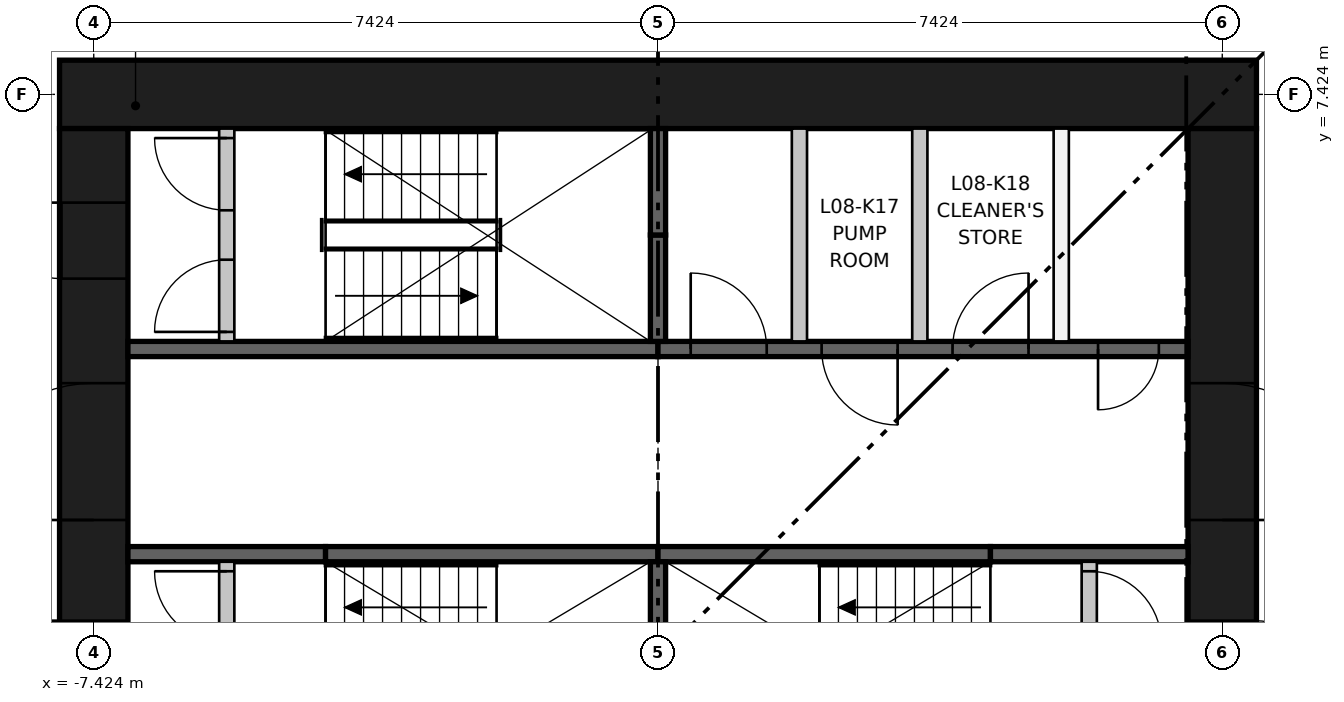
"""IFC4 building model, lengths in metres.
Left out: names, types, materials, properties, quantities, classifications, styles, units other than length and angle.
Written with IfcOpenShell. Run it as: python <this file> out.ifc"""

import sys

from ifc_helpers import new_model, si_unit, direction, frame, frame_2d, origin, place, context, subcontext, project, spatial, rectangle, extrude, element, fill, save


model = new_model("IFC4")
c1 = context("Model", 3, precision=1e-05, world=origin(), true_north=direction((0.0, 1.0)))
c2 = subcontext(c1, "Body", "Model", "MODEL_VIEW")
j1 = project(units=[si_unit("LENGTHUNIT", "METRE"), si_unit("PLANEANGLEUNIT", "RADIAN")], contexts=[c1])
p1 = place(None, origin())
s1 = spatial("IfcSite", under=j1, at=p1, CompositionType="ELEMENT")
p2 = place(p1, origin())
s2 = spatial("IfcBuilding", under=s1, at=p2, CompositionType="ELEMENT")
p3 = place(p2, frame((0.0, 0.0, 33.5)))
s3 = spatial("IfcBuildingStorey", under=s2, at=p3, CompositionType="ELEMENT", Elevation=33.5)
p4 = place(p3, frame((-7.874, 7.424, 0.0), z_axis=(0.0, 0.0, 1.0), x_axis=(1.0, 0.0, 0.0)))
e1 = element("IfcWall", 1, at=p4, inside=s3, PredefinedType="SHEAR", context=c2, shape_type="SweptSolid", body=[
    extrude(rectangle(XDim=15.748, YDim=0.9, at=frame_2d((7.874, 0.0))), origin(), (0.0, 0.0, 1.0), 3.65),
])
p5 = place(p3, frame((-7.424, -6.974, 0.0), z_axis=(0.0, 0.0, 1.0), x_axis=(0.0, 1.0, 0.0)))
e2 = element("IfcWall", 2, at=p5, inside=s3, PredefinedType="SHEAR", context=c2, shape_type="SweptSolid", body=[
    extrude(rectangle(XDim=13.948, YDim=0.9, at=frame_2d((6.974, 0.0))), origin(), (0.0, 0.0, 1.0), 3.65),
])
p6 = place(p5, frame((6.474, 0.0, 0.0)))
e3 = element("IfcOpeningElement", 3, at=p6, cuts=e2, PredefinedType="OPENING", context=c2, shape_type="SweptSolid", body=[
    extrude(rectangle(XDim=1.0, YDim=2.1, at=frame_2d((0.5, 1.05))), frame((0.0, 0.46, 0.0), z_axis=(0.0, -1.0, 0.0), x_axis=(1.0, 0.0, 0.0)), (0.0, 0.0, 1.0), 0.92),
])
p7 = place(p5, frame((3.35, 0.0, 0.0)))
e4 = element("IfcOpeningElement", 4, at=p7, cuts=e2, PredefinedType="OPENING", context=c2, shape_type="SweptSolid", body=[
    extrude(rectangle(XDim=1.8, YDim=2.1, at=frame_2d((0.9, 1.05))), frame((0.0, 0.46, 0.0), z_axis=(0.0, -1.0, 0.0), x_axis=(1.0, 0.0, 0.0)), (0.0, 0.0, 1.0), 0.92),
])
p8 = place(p5, frame((8.799, 0.0, 0.0)))
e5 = element("IfcOpeningElement", 5, at=p8, cuts=e2, PredefinedType="OPENING", context=c2, shape_type="SweptSolid", body=[
    extrude(rectangle(XDim=1.8, YDim=2.1, at=frame_2d((0.9, 1.05))), frame((0.0, 0.46, 0.0), z_axis=(0.0, -1.0, 0.0), x_axis=(1.0, 0.0, 0.0)), (0.0, 0.0, 1.0), 0.92),
])
p9 = place(p5, frame((11.974, 0.0, 0.0)))
e6 = element("IfcOpeningElement", 6, at=p9, cuts=e2, PredefinedType="OPENING", context=c2, shape_type="SweptSolid", body=[
    extrude(rectangle(XDim=1.0, YDim=2.1, at=frame_2d((0.5, 1.05))), frame((0.0, 0.46, 0.0), z_axis=(0.0, -1.0, 0.0), x_axis=(1.0, 0.0, 0.0)), (0.0, 0.0, 1.0), 0.92),
])
p10 = place(p3, frame((7.424, -6.974, 0.0), z_axis=(0.0, 0.0, 1.0), x_axis=(0.0, 1.0, 0.0)))
e7 = element("IfcWall", 7, at=p10, inside=s3, PredefinedType="SHEAR", context=c2, shape_type="SweptSolid", body=[
    extrude(rectangle(XDim=13.948, YDim=0.9, at=frame_2d((6.974, 0.0))), origin(), (0.0, 0.0, 1.0), 3.65),
])
p11 = place(p10, frame((6.474, 0.0, 0.0)))
e8 = element("IfcOpeningElement", 8, at=p11, cuts=e7, PredefinedType="OPENING", context=c2, shape_type="SweptSolid", body=[
    extrude(rectangle(XDim=1.0, YDim=2.1, at=frame_2d((0.5, 1.05))), frame((0.0, 0.46, 0.0), z_axis=(0.0, -1.0, 0.0), x_axis=(1.0, 0.0, 0.0)), (0.0, 0.0, 1.0), 0.92),
])
p12 = place(p10, frame((3.35, 0.0, 0.0)))
e9 = element("IfcOpeningElement", 9, at=p12, cuts=e7, PredefinedType="OPENING", context=c2, shape_type="SweptSolid", body=[
    extrude(rectangle(XDim=1.8, YDim=2.1, at=frame_2d((0.9, 1.05))), frame((0.0, 0.46, 0.0), z_axis=(0.0, -1.0, 0.0), x_axis=(1.0, 0.0, 0.0)), (0.0, 0.0, 1.0), 0.92),
])
p13 = place(p10, frame((8.799, 0.0, 0.0)))
e10 = element("IfcOpeningElement", 10, at=p13, cuts=e7, PredefinedType="OPENING", context=c2, shape_type="SweptSolid", body=[
    extrude(rectangle(XDim=1.8, YDim=2.1, at=frame_2d((0.9, 1.05))), frame((0.0, 0.46, 0.0), z_axis=(0.0, -1.0, 0.0), x_axis=(1.0, 0.0, 0.0)), (0.0, 0.0, 1.0), 0.92),
])
p14 = place(p3, frame((-6.974, 4.074, 0.0), z_axis=(0.0, 0.0, 1.0), x_axis=(1.0, 0.0, 0.0)))
e11 = element("IfcWall", 11, at=p14, inside=s3, PredefinedType="SHEAR", context=c2, shape_type="SweptSolid", body=[
    extrude(rectangle(XDim=6.974, YDim=0.2, at=frame_2d((3.487, 0.0))), origin(), (0.0, 0.0, 1.0), 3.3),
])
p15 = place(p3, frame((0.0, 4.074, 0.0), z_axis=(0.0, 0.0, 1.0), x_axis=(1.0, 0.0, 0.0)))
e12 = element("IfcWall", 12, at=p15, inside=s3, PredefinedType="SHEAR", context=c2, shape_type="SweptSolid", body=[
    extrude(rectangle(XDim=6.974, YDim=0.2, at=frame_2d((3.487, 0.0))), origin(), (0.0, 0.0, 1.0), 3.3),
])
p16 = place(p15, frame((0.43, 0.0, 0.0)))
e13 = element("IfcOpeningElement", 13, at=p16, cuts=e12, PredefinedType="OPENING", context=c2, shape_type="SweptSolid", body=[
    extrude(rectangle(XDim=1.0, YDim=2.1, at=frame_2d((0.5, 1.05))), frame((0.0, 0.11, 0.0), z_axis=(0.0, -1.0, 0.0), x_axis=(1.0, 0.0, 0.0)), (0.0, 0.0, 1.0), 0.22),
])
p17 = place(p15, frame((2.153, 0.0, 0.0)))
e14 = element("IfcOpeningElement", 14, at=p17, cuts=e12, PredefinedType="OPENING", context=c2, shape_type="SweptSolid", body=[
    extrude(rectangle(XDim=1.0, YDim=2.1, at=frame_2d((0.5, 1.05))), frame((0.0, 0.11, 0.0), z_axis=(0.0, -1.0, 0.0), x_axis=(1.0, 0.0, 0.0)), (0.0, 0.0, 1.0), 0.22),
])
p18 = place(p15, frame((3.875, 0.0, 0.0)))
e15 = element("IfcOpeningElement", 15, at=p18, cuts=e12, PredefinedType="OPENING", context=c2, shape_type="SweptSolid", body=[
    extrude(rectangle(XDim=1.0, YDim=2.1, at=frame_2d((0.5, 1.05))), frame((0.0, 0.11, 0.0), z_axis=(0.0, -1.0, 0.0), x_axis=(1.0, 0.0, 0.0)), (0.0, 0.0, 1.0), 0.22),
])
p19 = place(p15, frame((5.79, 0.0, 0.0)))
e16 = element("IfcOpeningElement", 16, at=p19, cuts=e12, PredefinedType="OPENING", context=c2, shape_type="SweptSolid", body=[
    extrude(rectangle(XDim=0.8, YDim=2.1, at=frame_2d((0.4, 1.05))), frame((0.0, 0.11, 0.0), z_axis=(0.0, -1.0, 0.0), x_axis=(1.0, 0.0, 0.0)), (0.0, 0.0, 1.0), 0.22),
])
p20 = place(p3, frame((-6.974, 1.375, 0.0), z_axis=(0.0, 0.0, 1.0), x_axis=(1.0, 0.0, 0.0)))
e17 = element("IfcWall", 17, at=p20, inside=s3, PredefinedType="SHEAR", context=c2, shape_type="SweptSolid", body=[
    extrude(rectangle(XDim=2.6, YDim=0.2, at=frame_2d((1.3, 0.0))), origin(), (0.0, 0.0, 1.0), 3.3),
])
for number, where, z_axis, x_axis in (
    (18, (-4.374, 1.375, 0.0), (0.0, 0.0, 1.0), (1.0, 0.0, 0.0)),
    (19, (0.0, 1.375, 0.0), (0.0, 0.0, 1.0), (1.0, 0.0, 0.0)),
):
    element("IfcWall", number, at=place(p3, frame(where, z_axis=z_axis, x_axis=x_axis)), inside=s3, PredefinedType="SHEAR", context=c2, shape_type="SweptSolid", body=[
        extrude(rectangle(XDim=4.374, YDim=0.2, at=frame_2d((2.187, 0.0))), origin(), (0.0, 0.0, 1.0), 3.3),
    ])
p21 = place(p3, frame((4.374, 1.375, 0.0), z_axis=(0.0, 0.0, 1.0), x_axis=(1.0, 0.0, 0.0)))
e20 = element("IfcWall", 20, at=p21, inside=s3, PredefinedType="SHEAR", context=c2, shape_type="SweptSolid", body=[
    extrude(rectangle(XDim=2.6, YDim=0.2, at=frame_2d((1.3, 0.0))), origin(), (0.0, 0.0, 1.0), 3.3),
])
p22 = place(p3, frame((0.0, -1.275, 0.0), z_axis=(0.0, 0.0, 1.0), x_axis=(0.0, 1.0, 0.0)))
e21 = element("IfcWall", 21, at=p22, inside=s3, PredefinedType="SHEAR", context=c2, shape_type="SweptSolid", body=[
    extrude(rectangle(XDim=2.55, YDim=0.2, at=frame_2d((1.275, 0.0))), origin(), (0.0, 0.0, 1.0), 3.3),
])
p23 = place(p3, frame((0.0, 4.174, 0.0), z_axis=(0.0, 0.0, 1.0), x_axis=(0.0, 1.0, 0.0)))
e22 = element("IfcWall", 22, at=p23, inside=s3, PredefinedType="SHEAR", context=c2, shape_type="SweptSolid", body=[
    extrude(rectangle(XDim=1.4, YDim=0.2, at=frame_2d((0.7, 0.0))), origin(), (0.0, 0.0, 1.0), 3.3),
])
p24 = place(p3, frame((0.0, 5.574, 0.0), z_axis=(0.0, 0.0, 1.0), x_axis=(0.0, 1.0, 0.0)))
e23 = element("IfcWall", 23, at=p24, inside=s3, PredefinedType="SHEAR", context=c2, shape_type="SweptSolid", body=[
    extrude(rectangle(XDim=1.4, YDim=0.2, at=frame_2d((0.7, 0.0))), origin(), (0.0, 0.0, 1.0), 3.3),
])
for number, where, z_axis, x_axis in (
    (24, (1.861, 4.174, 0.0), (0.0, 0.0, 1.0), (0.0, 1.0, 0.0)),
    (25, (3.445, 4.174, 0.0), (0.0, 0.0, 1.0), (0.0, 1.0, 0.0)),
    (26, (5.305, 4.174, 0.0), (0.0, 0.0, 1.0), (0.0, 1.0, 0.0)),
):
    element("IfcWall", number, at=place(p3, frame(where, z_axis=z_axis, x_axis=x_axis)), inside=s3, PredefinedType="PARTITIONING", context=c2, shape_type="SweptSolid", body=[
        extrude(rectangle(XDim=2.8, YDim=0.2, at=frame_2d((1.4, 0.0))), origin(), (0.0, 0.0, 1.0), 3.3),
    ])
p25 = place(p3, frame((-5.674, -1.275, 0.0), z_axis=(0.0, 0.0, 1.0), x_axis=(0.0, 1.0, 0.0)))
e27 = element("IfcWall", 27, at=p25, inside=s3, PredefinedType="PARTITIONING", context=c2, shape_type="SweptSolid", body=[
    extrude(rectangle(XDim=2.55, YDim=0.2, at=frame_2d((1.275, 0.0))), origin(), (0.0, 0.0, 1.0), 3.3),
])
p26 = place(p25, frame((0.125, 0.0, 0.0)))
e28 = element("IfcOpeningElement", 28, at=p26, cuts=e27, PredefinedType="OPENING", context=c2, shape_type="SweptSolid", body=[
    extrude(rectangle(XDim=0.95, YDim=2.1, at=frame_2d((0.475, 1.05))), frame((0.0, 0.11, 0.0), z_axis=(0.0, -1.0, 0.0), x_axis=(1.0, 0.0, 0.0)), (0.0, 0.0, 1.0), 0.22),
])
p27 = place(p25, frame((1.475, 0.0, 0.0)))
e29 = element("IfcOpeningElement", 29, at=p27, cuts=e27, PredefinedType="OPENING", context=c2, shape_type="SweptSolid", body=[
    extrude(rectangle(XDim=0.95, YDim=2.1, at=frame_2d((0.475, 1.05))), frame((0.0, 0.11, 0.0), z_axis=(0.0, -1.0, 0.0), x_axis=(1.0, 0.0, 0.0)), (0.0, 0.0, 1.0), 0.22),
])
p28 = place(p3, frame((5.674, -1.275, 0.0), z_axis=(0.0, 0.0, 1.0), x_axis=(0.0, 1.0, 0.0)))
e30 = element("IfcWall", 30, at=p28, inside=s3, PredefinedType="PARTITIONING", context=c2, shape_type="SweptSolid", body=[
    extrude(rectangle(XDim=2.55, YDim=0.2, at=frame_2d((1.275, 0.0))), origin(), (0.0, 0.0, 1.0), 3.3),
])
p29 = place(p28, frame((0.125, 0.0, 0.0)))
e31 = element("IfcOpeningElement", 31, at=p29, cuts=e30, PredefinedType="OPENING", context=c2, shape_type="SweptSolid", body=[
    extrude(rectangle(XDim=0.95, YDim=2.1, at=frame_2d((0.475, 1.05))), frame((0.0, 0.11, 0.0), z_axis=(0.0, -1.0, 0.0), x_axis=(1.0, 0.0, 0.0)), (0.0, 0.0, 1.0), 0.22),
])
p30 = place(p28, frame((1.475, 0.0, 0.0)))
e32 = element("IfcOpeningElement", 32, at=p30, cuts=e30, PredefinedType="OPENING", context=c2, shape_type="SweptSolid", body=[
    extrude(rectangle(XDim=0.95, YDim=2.1, at=frame_2d((0.475, 1.05))), frame((0.0, 0.11, 0.0), z_axis=(0.0, -1.0, 0.0), x_axis=(1.0, 0.0, 0.0)), (0.0, 0.0, 1.0), 0.22),
])
p31 = place(p3, frame((-5.674, 4.174, 0.0), z_axis=(0.0, 0.0, 1.0), x_axis=(0.0, 1.0, 0.0)))
e33 = element("IfcWall", 33, at=p31, inside=s3, PredefinedType="PARTITIONING", context=c2, shape_type="SweptSolid", body=[
    extrude(rectangle(XDim=2.8, YDim=0.2, at=frame_2d((1.4, 0.0))), origin(), (0.0, 0.0, 1.0), 3.3),
])
p32 = place(p31, frame((0.125, 0.0, 0.0)))
e34 = element("IfcOpeningElement", 34, at=p32, cuts=e33, PredefinedType="OPENING", context=c2, shape_type="SweptSolid", body=[
    extrude(rectangle(XDim=0.95, YDim=2.1, at=frame_2d((0.475, 1.05))), frame((0.0, 0.11, 0.0), z_axis=(0.0, -1.0, 0.0), x_axis=(1.0, 0.0, 0.0)), (0.0, 0.0, 1.0), 0.22),
])
p33 = place(p31, frame((1.725, 0.0, 0.0)))
e35 = element("IfcOpeningElement", 35, at=p33, cuts=e33, PredefinedType="OPENING", context=c2, shape_type="SweptSolid", body=[
    extrude(rectangle(XDim=0.95, YDim=2.1, at=frame_2d((0.475, 1.05))), frame((0.0, 0.11, 0.0), z_axis=(0.0, -1.0, 0.0), x_axis=(1.0, 0.0, 0.0)), (0.0, 0.0, 1.0), 0.22),
])
p34 = place(p27, origin())
e36 = element("IfcDoor", 36, at=p34, inside=s3, OperationType="SINGLE_SWING_RIGHT", PredefinedType="DOOR", context=c2, shape_type="SweptSolid", body=[
    extrude(rectangle(XDim=0.95, YDim=2.1, at=frame_2d((0.475, 1.05))), frame((0.0, 0.025, 0.0), z_axis=(0.0, -1.0, 0.0), x_axis=(1.0, 0.0, 0.0)), (0.0, 0.0, 1.0), 0.05),
])
fill(e29, e36)
p35 = place(p30, frame((0.95, 0.0, 0.0), z_axis=(0.0, 0.0, 1.0), x_axis=(-1.0, 0.0, 0.0)))
e37 = element("IfcDoor", 37, at=p35, inside=s3, OperationType="SINGLE_SWING_LEFT", PredefinedType="DOOR", context=c2, shape_type="SweptSolid", body=[
    extrude(rectangle(XDim=0.95, YDim=2.1, at=frame_2d((0.475, 1.05))), frame((0.0, 0.025, 0.0), z_axis=(0.0, -1.0, 0.0), x_axis=(1.0, 0.0, 0.0)), (0.0, 0.0, 1.0), 0.05),
])
fill(e32, e37)
p36 = place(p32, origin())
e38 = element("IfcDoor", 38, at=p36, inside=s3, OperationType="SINGLE_SWING_LEFT", PredefinedType="DOOR", context=c2, shape_type="SweptSolid", body=[
    extrude(rectangle(XDim=0.95, YDim=2.1, at=frame_2d((0.475, 1.05))), frame((0.0, 0.025, 0.0), z_axis=(0.0, -1.0, 0.0), x_axis=(1.0, 0.0, 0.0)), (0.0, 0.0, 1.0), 0.05),
])
fill(e34, e38)
p37 = place(p33, origin())
e39 = element("IfcDoor", 39, at=p37, inside=s3, OperationType="SINGLE_SWING_RIGHT", PredefinedType="DOOR", context=c2, shape_type="SweptSolid", body=[
    extrude(rectangle(XDim=0.95, YDim=2.1, at=frame_2d((0.475, 1.05))), frame((0.0, 0.025, 0.0), z_axis=(0.0, -1.0, 0.0), x_axis=(1.0, 0.0, 0.0)), (0.0, 0.0, 1.0), 0.05),
])
fill(e35, e39)
p38 = place(p16, origin())
e40 = element("IfcDoor", 40, at=p38, inside=s3, OperationType="SINGLE_SWING_LEFT", PredefinedType="DOOR", context=c2, shape_type="SweptSolid", body=[
    extrude(rectangle(XDim=1.0, YDim=2.1, at=frame_2d((0.5, 1.05))), frame((0.0, 0.025, 0.0), z_axis=(0.0, -1.0, 0.0), x_axis=(1.0, 0.0, 0.0)), (0.0, 0.0, 1.0), 0.05),
])
fill(e13, e40)
p39 = place(p17, frame((1.0, 0.0, 0.0), z_axis=(0.0, 0.0, 1.0), x_axis=(-1.0, 0.0, 0.0)))
e41 = element("IfcDoor", 41, at=p39, inside=s3, OperationType="SINGLE_SWING_RIGHT", PredefinedType="DOOR", context=c2, shape_type="SweptSolid", body=[
    extrude(rectangle(XDim=1.0, YDim=2.1, at=frame_2d((0.5, 1.05))), frame((0.0, 0.025, 0.0), z_axis=(0.0, -1.0, 0.0), x_axis=(1.0, 0.0, 0.0)), (0.0, 0.0, 1.0), 0.05),
])
fill(e14, e41)
p40 = place(p18, origin())
e42 = element("IfcDoor", 42, at=p40, inside=s3, OperationType="SINGLE_SWING_RIGHT", PredefinedType="DOOR", context=c2, shape_type="SweptSolid", body=[
    extrude(rectangle(XDim=1.0, YDim=2.1, at=frame_2d((0.5, 1.05))), frame((0.0, 0.025, 0.0), z_axis=(0.0, -1.0, 0.0), x_axis=(1.0, 0.0, 0.0)), (0.0, 0.0, 1.0), 0.05),
])
fill(e15, e42)
p41 = place(p19, frame((0.8, 0.0, 0.0), z_axis=(0.0, 0.0, 1.0), x_axis=(-1.0, 0.0, 0.0)))
e43 = element("IfcDoor", 43, at=p41, inside=s3, OperationType="SINGLE_SWING_LEFT", PredefinedType="DOOR", context=c2, shape_type="SweptSolid", body=[
    extrude(rectangle(XDim=0.8, YDim=2.1, at=frame_2d((0.4, 1.05))), frame((0.0, 0.025, 0.0), z_axis=(0.0, -1.0, 0.0), x_axis=(1.0, 0.0, 0.0)), (0.0, 0.0, 1.0), 0.05),
])
fill(e16, e43)
p42 = place(p6, origin())
e44 = element("IfcDoor", 44, at=p42, inside=s3, OperationType="SINGLE_SWING_RIGHT", PredefinedType="DOOR", context=c2, shape_type="SweptSolid", body=[
    extrude(rectangle(XDim=1.0, YDim=2.1, at=frame_2d((0.5, 1.05))), frame((0.0, 0.45, 0.0), z_axis=(0.0, -1.0, 0.0), x_axis=(1.0, 0.0, 0.0)), (0.0, 0.0, 1.0), 0.05),
])
fill(e3, e44)
p43 = place(p8, origin())
e45 = element("IfcDoor", 45, at=p43, inside=s3, OperationType="DOUBLE_DOOR_SINGLE_SWING", PredefinedType="DOOR", context=c2, shape_type="SweptSolid", body=[
    extrude(rectangle(XDim=1.8, YDim=2.1, at=frame_2d((0.9, 1.05))), frame((0.0, 0.025, 0.0), z_axis=(0.0, -1.0, 0.0), x_axis=(1.0, 0.0, 0.0)), (0.0, 0.0, 1.0), 0.05),
])
fill(e5, e45)
p44 = place(p9, origin())
e46 = element("IfcDoor", 46, at=p44, inside=s3, OperationType="SINGLE_SWING_RIGHT", PredefinedType="DOOR", context=c2, shape_type="SweptSolid", body=[
    extrude(rectangle(XDim=1.0, YDim=2.1, at=frame_2d((0.5, 1.05))), frame((0.0, 0.45, 0.0), z_axis=(0.0, -1.0, 0.0), x_axis=(1.0, 0.0, 0.0)), (0.0, 0.0, 1.0), 0.05),
])
fill(e6, e46)
p45 = place(p11, frame((1.0, 0.0, 0.0), z_axis=(0.0, 0.0, 1.0), x_axis=(-1.0, 0.0, 0.0)))
e47 = element("IfcDoor", 47, at=p45, inside=s3, OperationType="SINGLE_SWING_LEFT", PredefinedType="DOOR", context=c2, shape_type="SweptSolid", body=[
    extrude(rectangle(XDim=1.0, YDim=2.1, at=frame_2d((0.5, 1.05))), frame((0.0, 0.45, 0.0), z_axis=(0.0, -1.0, 0.0), x_axis=(1.0, 0.0, 0.0)), (0.0, 0.0, 1.0), 0.05),
])
fill(e8, e47)
p46 = place(p13, frame((1.8, 0.0, 0.0), z_axis=(0.0, 0.0, 1.0), x_axis=(-1.0, 0.0, 0.0)))
e48 = element("IfcDoor", 48, at=p46, inside=s3, OperationType="DOUBLE_DOOR_SINGLE_SWING", PredefinedType="DOOR", context=c2, shape_type="SweptSolid", body=[
    extrude(rectangle(XDim=1.8, YDim=2.1, at=frame_2d((0.9, 1.05))), frame((0.0, 0.025, 0.0), z_axis=(0.0, -1.0, 0.0), x_axis=(1.0, 0.0, 0.0)), (0.0, 0.0, 1.0), 0.05),
])
fill(e10, e48)
save(model, sys.argv[1])
